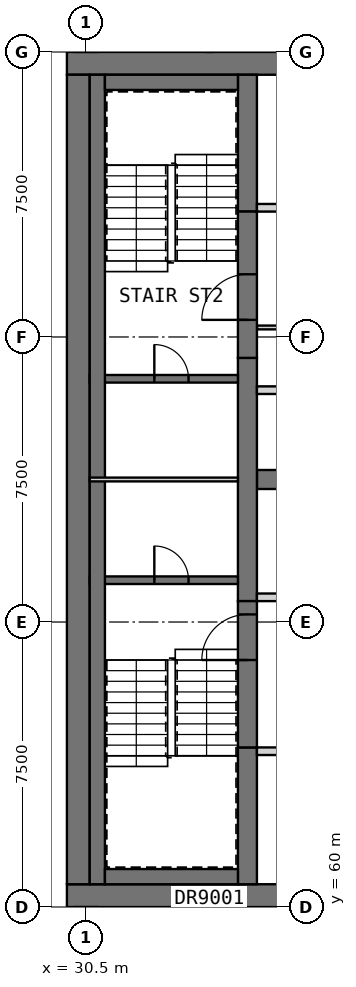
"""IFC4 building model, lengths in metres.
Left out: names, types, materials, properties, quantities, classifications, styles, units other than length and angle.
Written with IfcOpenShell. Run it as: python <this file> out.ifc"""

import sys

from ifc_helpers import new_model, si_unit, direction, frame, frame_2d, origin, place, context, subcontext, project, spatial, rectangle, extrude, element, fill, save


model = new_model("IFC4")
c1 = context("Model", 3, precision=1e-05, world=origin(), true_north=direction((0.0, 1.0)))
c2 = subcontext(c1, "Body", "Model", "MODEL_VIEW")
j1 = project(units=[si_unit("LENGTHUNIT", "METRE"), si_unit("PLANEANGLEUNIT", "RADIAN")], contexts=[c1])
p1 = place(None, origin())
s1 = spatial("IfcSite", under=j1, at=p1, CompositionType="ELEMENT")
p2 = place(p1, origin())
s2 = spatial("IfcBuilding", under=s1, at=p2, CompositionType="ELEMENT")
p3 = place(p2, frame((0.0, 0.0, 280.2)))
s3 = spatial("IfcBuildingStorey", under=s2, at=p3, CompositionType="ELEMENT", Elevation=280.2)
p4 = place(p3, frame((30.0, 60.3, 0.0), z_axis=(0.0, 0.0, 1.0), x_axis=(1.0, 0.0, 0.0)))
e1 = element("IfcWall", 1, at=p4, inside=s3, PredefinedType="SHEAR", context=c2, shape_type="SweptSolid", body=[
    extrude(rectangle(XDim=30.0, YDim=0.6, at=frame_2d((15.0, 0.0))), origin(), (0.0, 0.0, 1.0), 3.5),
])
p5 = place(p4, frame((21.9, 0.0, 0.0)))
e2 = element("IfcOpeningElement", 2, at=p5, cuts=e1, PredefinedType="OPENING", context=c2, shape_type="SweptSolid", body=[
    extrude(rectangle(XDim=1.8, YDim=2.1, at=frame_2d((0.9, 1.05))), frame((0.0, 0.31, 0.0), z_axis=(0.0, -1.0, 0.0), x_axis=(1.0, 0.0, 0.0)), (0.0, 0.0, 1.0), 0.62),
])
p6 = place(p4, frame((26.5, 0.0, 0.0)))
e3 = element("IfcOpeningElement", 3, at=p6, cuts=e1, PredefinedType="OPENING", context=c2, shape_type="SweptSolid", body=[
    extrude(rectangle(XDim=1.2, YDim=2.1, at=frame_2d((0.6, 1.05))), frame((0.0, 0.31, 0.0), z_axis=(0.0, -1.0, 0.0), x_axis=(1.0, 0.0, 0.0)), (0.0, 0.0, 1.0), 0.62),
])
p7 = place(p3, frame((30.0, 82.2, 0.0), z_axis=(0.0, 0.0, 1.0), x_axis=(1.0, 0.0, 0.0)))
e4 = element("IfcWall", 4, at=p7, inside=s3, PredefinedType="SHEAR", context=c2, shape_type="SweptSolid", body=[
    extrude(rectangle(XDim=30.0, YDim=0.6, at=frame_2d((15.0, 0.0))), origin(), (0.0, 0.0, 1.0), 3.5),
])
p8 = place(p3, frame((30.3, 60.6, 0.0), z_axis=(0.0, 0.0, 1.0), x_axis=(0.0, 1.0, 0.0)))
e5 = element("IfcWall", 5, at=p8, inside=s3, PredefinedType="SHEAR", context=c2, shape_type="SweptSolid", body=[
    extrude(rectangle(XDim=21.3, YDim=0.6, at=frame_2d((10.65, 0.0))), origin(), (0.0, 0.0, 1.0), 3.5),
])
p9 = place(p3, frame((35.0, 71.25, 0.0), z_axis=(0.0, 0.0, 1.0), x_axis=(1.0, 0.0, 0.0)))
e6 = element("IfcWall", 6, at=p9, inside=s3, PredefinedType="SHEAR", context=c2, shape_type="SweptSolid", body=[
    extrude(rectangle(XDim=15.6, YDim=0.5, at=frame_2d((7.8, 0.0))), origin(), (0.0, 0.0, 1.0), 3.5),
])
p10 = place(p3, frame((34.75, 60.6, 0.0), z_axis=(0.0, 0.0, 1.0), x_axis=(0.0, 1.0, 0.0)))
e7 = element("IfcWall", 7, at=p10, inside=s3, PredefinedType="SHEAR", context=c2, shape_type="SweptSolid", body=[
    extrude(rectangle(XDim=3.6, YDim=0.5, at=frame_2d((1.8, 0.0))), origin(), (0.0, 0.0, 1.0), 3.5),
])
p11 = place(p3, frame((34.75, 68.05, 0.0), z_axis=(0.0, 0.0, 1.0), x_axis=(0.0, 1.0, 0.0)))
e8 = element("IfcWall", 8, at=p11, inside=s3, PredefinedType="SHEAR", context=c2, shape_type="SweptSolid", body=[
    extrude(rectangle(XDim=6.4, YDim=0.5, at=frame_2d((3.2, 0.0))), origin(), (0.0, 0.0, 1.0), 3.5),
])
p12 = place(p3, frame((34.75, 78.3, 0.0), z_axis=(0.0, 0.0, 1.0), x_axis=(0.0, 1.0, 0.0)))
e9 = element("IfcWall", 9, at=p12, inside=s3, PredefinedType="SHEAR", context=c2, shape_type="SweptSolid", body=[
    extrude(rectangle(XDim=3.6, YDim=0.5, at=frame_2d((1.8, 0.0))), origin(), (0.0, 0.0, 1.0), 3.5),
])
p13 = place(p2, frame((0.0, 0.0, 34.0)))
s4 = spatial("IfcBuildingStorey", under=s2, at=p13, CompositionType="ELEMENT", Elevation=34.0)
for number, where, z_axis, x_axis in (
    (10, (29.7, 61.05, 0.0), (0.0, 0.0, 1.0), (0.0, 1.0, 0.0)),
    (11, (29.7, 65.925, 0.0), (0.0, 0.0, 1.0), (0.0, 1.0, 0.0)),
    (12, (29.7, 70.8, 0.0), (0.0, 0.0, 1.0), (0.0, 1.0, 0.0)),
    (13, (29.7, 75.675, 0.0), (0.0, 0.0, 1.0), (0.0, 1.0, 0.0)),
    (14, (29.7, 80.55, 0.0), (0.0, 0.0, 1.0), (0.0, 1.0, 0.0)),
):
    element("IfcWall", number, at=place(p13, frame(where, z_axis=z_axis, x_axis=x_axis)), inside=s4, PredefinedType="SOLIDWALL", context=c2, shape_type="SweptSolid", body=[
        extrude(rectangle(XDim=0.9, YDim=0.6, at=frame_2d((0.45, 0.0))), origin(), (0.0, 0.0, 1.0), 286.2),
    ])
p14 = place(p3, frame((35.0, 64.1, 0.0), z_axis=(0.0, 0.0, 1.0), x_axis=(1.0, 0.0, 0.0)))
e15 = element("IfcWall", 15, at=p14, inside=s3, PredefinedType="PARTITIONING", context=c2, shape_type="SweptSolid", body=[
    extrude(rectangle(XDim=15.6, YDim=0.2, at=frame_2d((7.8, 0.0))), origin(), (0.0, 0.0, 1.0), 3.25),
])
p15 = place(p14, frame((2.15, 0.0, 0.0)))
e16 = element("IfcOpeningElement", 16, at=p15, cuts=e15, PredefinedType="OPENING", context=c2, shape_type="SweptSolid", body=[
    extrude(rectangle(XDim=0.9, YDim=2.1, at=frame_2d((0.45, 1.05))), frame((0.0, 0.11, 0.0), z_axis=(0.0, -1.0, 0.0), x_axis=(1.0, 0.0, 0.0)), (0.0, 0.0, 1.0), 0.22),
])
p16 = place(p14, frame((9.95, 0.0, 0.0)))
e17 = element("IfcOpeningElement", 17, at=p16, cuts=e15, PredefinedType="OPENING", context=c2, shape_type="SweptSolid", body=[
    extrude(rectangle(XDim=0.9, YDim=2.1, at=frame_2d((0.45, 1.05))), frame((0.0, 0.11, 0.0), z_axis=(0.0, -1.0, 0.0), x_axis=(1.0, 0.0, 0.0)), (0.0, 0.0, 1.0), 0.22),
])
p17 = place(p3, frame((35.0, 68.15, 0.0), z_axis=(0.0, 0.0, 1.0), x_axis=(1.0, 0.0, 0.0)))
e18 = element("IfcWall", 18, at=p17, inside=s3, PredefinedType="PARTITIONING", context=c2, shape_type="SweptSolid", body=[
    extrude(rectangle(XDim=15.6, YDim=0.2, at=frame_2d((7.8, 0.0))), origin(), (0.0, 0.0, 1.0), 3.25),
])
p18 = place(p17, frame((1.5, 0.0, 0.0)))
e19 = element("IfcOpeningElement", 19, at=p18, cuts=e18, PredefinedType="OPENING", context=c2, shape_type="SweptSolid", body=[
    extrude(rectangle(XDim=0.9, YDim=2.1, at=frame_2d((0.45, 1.05))), frame((0.0, 0.11, 0.0), z_axis=(0.0, -1.0, 0.0), x_axis=(1.0, 0.0, 0.0)), (0.0, 0.0, 1.0), 0.22),
])
p19 = place(p17, frame((7.35, 0.0, 0.0)))
e20 = element("IfcOpeningElement", 20, at=p19, cuts=e18, PredefinedType="OPENING", context=c2, shape_type="SweptSolid", body=[
    extrude(rectangle(XDim=0.9, YDim=2.1, at=frame_2d((0.45, 1.05))), frame((0.0, 0.11, 0.0), z_axis=(0.0, -1.0, 0.0), x_axis=(1.0, 0.0, 0.0)), (0.0, 0.0, 1.0), 0.22),
])
p20 = place(p17, frame((13.2, 0.0, 0.0)))
e21 = element("IfcOpeningElement", 21, at=p20, cuts=e18, PredefinedType="OPENING", context=c2, shape_type="SweptSolid", body=[
    extrude(rectangle(XDim=0.9, YDim=2.1, at=frame_2d((0.45, 1.05))), frame((0.0, 0.11, 0.0), z_axis=(0.0, -1.0, 0.0), x_axis=(1.0, 0.0, 0.0)), (0.0, 0.0, 1.0), 0.22),
])
p21 = place(p3, frame((35.0, 73.6, 0.0), z_axis=(0.0, 0.0, 1.0), x_axis=(1.0, 0.0, 0.0)))
e22 = element("IfcWall", 22, at=p21, inside=s3, PredefinedType="SOLIDWALL", context=c2, shape_type="SweptSolid", body=[
    extrude(rectangle(XDim=15.6, YDim=0.2, at=frame_2d((7.8, 0.0))), origin(), (0.0, 0.0, 1.0), 3.5),
])
p22 = place(p21, frame((0.75, 0.0, 0.0)))
e23 = element("IfcOpeningElement", 23, at=p22, cuts=e22, PredefinedType="OPENING", context=c2, shape_type="SweptSolid", body=[
    extrude(rectangle(XDim=1.1, YDim=2.1, at=frame_2d((0.55, 1.05))), frame((0.0, 0.11, 0.0), z_axis=(0.0, -1.0, 0.0), x_axis=(1.0, 0.0, 0.0)), (0.0, 0.0, 1.0), 0.22),
])
p23 = place(p21, frame((3.35, 0.0, 0.0)))
e24 = element("IfcOpeningElement", 24, at=p23, cuts=e22, PredefinedType="OPENING", context=c2, shape_type="SweptSolid", body=[
    extrude(rectangle(XDim=1.1, YDim=2.1, at=frame_2d((0.55, 1.05))), frame((0.0, 0.11, 0.0), z_axis=(0.0, -1.0, 0.0), x_axis=(1.0, 0.0, 0.0)), (0.0, 0.0, 1.0), 0.22),
])
p24 = place(p21, frame((5.95, 0.0, 0.0)))
e25 = element("IfcOpeningElement", 25, at=p24, cuts=e22, PredefinedType="OPENING", context=c2, shape_type="SweptSolid", body=[
    extrude(rectangle(XDim=1.1, YDim=2.1, at=frame_2d((0.55, 1.05))), frame((0.0, 0.11, 0.0), z_axis=(0.0, -1.0, 0.0), x_axis=(1.0, 0.0, 0.0)), (0.0, 0.0, 1.0), 0.22),
])
p25 = place(p21, frame((8.55, 0.0, 0.0)))
e26 = element("IfcOpeningElement", 26, at=p25, cuts=e22, PredefinedType="OPENING", context=c2, shape_type="SweptSolid", body=[
    extrude(rectangle(XDim=1.1, YDim=2.1, at=frame_2d((0.55, 1.05))), frame((0.0, 0.11, 0.0), z_axis=(0.0, -1.0, 0.0), x_axis=(1.0, 0.0, 0.0)), (0.0, 0.0, 1.0), 0.22),
])
p26 = place(p21, frame((11.15, 0.0, 0.0)))
e27 = element("IfcOpeningElement", 27, at=p26, cuts=e22, PredefinedType="OPENING", context=c2, shape_type="SweptSolid", body=[
    extrude(rectangle(XDim=1.1, YDim=2.1, at=frame_2d((0.55, 1.05))), frame((0.0, 0.11, 0.0), z_axis=(0.0, -1.0, 0.0), x_axis=(1.0, 0.0, 0.0)), (0.0, 0.0, 1.0), 0.22),
])
p27 = place(p21, frame((13.75, 0.0, 0.0)))
e28 = element("IfcOpeningElement", 28, at=p27, cuts=e22, PredefinedType="OPENING", context=c2, shape_type="SweptSolid", body=[
    extrude(rectangle(XDim=1.1, YDim=2.1, at=frame_2d((0.55, 1.05))), frame((0.0, 0.11, 0.0), z_axis=(0.0, -1.0, 0.0), x_axis=(1.0, 0.0, 0.0)), (0.0, 0.0, 1.0), 0.22),
])
p28 = place(p3, frame((35.0, 78.4, 0.0), z_axis=(0.0, 0.0, 1.0), x_axis=(1.0, 0.0, 0.0)))
e29 = element("IfcWall", 29, at=p28, inside=s3, PredefinedType="SOLIDWALL", context=c2, shape_type="SweptSolid", body=[
    extrude(rectangle(XDim=15.6, YDim=0.2, at=frame_2d((7.8, 0.0))), origin(), (0.0, 0.0, 1.0), 3.5),
])
p29 = place(p28, frame((0.75, 0.0, 0.0)))
e30 = element("IfcOpeningElement", 30, at=p29, cuts=e29, PredefinedType="OPENING", context=c2, shape_type="SweptSolid", body=[
    extrude(rectangle(XDim=1.1, YDim=2.1, at=frame_2d((0.55, 1.05))), frame((0.0, 0.11, 0.0), z_axis=(0.0, -1.0, 0.0), x_axis=(1.0, 0.0, 0.0)), (0.0, 0.0, 1.0), 0.22),
])
p30 = place(p28, frame((3.35, 0.0, 0.0)))
e31 = element("IfcOpeningElement", 31, at=p30, cuts=e29, PredefinedType="OPENING", context=c2, shape_type="SweptSolid", body=[
    extrude(rectangle(XDim=1.1, YDim=2.1, at=frame_2d((0.55, 1.05))), frame((0.0, 0.11, 0.0), z_axis=(0.0, -1.0, 0.0), x_axis=(1.0, 0.0, 0.0)), (0.0, 0.0, 1.0), 0.22),
])
p31 = place(p28, frame((11.15, 0.0, 0.0)))
e32 = element("IfcOpeningElement", 32, at=p31, cuts=e29, PredefinedType="OPENING", context=c2, shape_type="SweptSolid", body=[
    extrude(rectangle(XDim=1.1, YDim=2.1, at=frame_2d((0.55, 1.05))), frame((0.0, 0.11, 0.0), z_axis=(0.0, -1.0, 0.0), x_axis=(1.0, 0.0, 0.0)), (0.0, 0.0, 1.0), 0.22),
])
p32 = place(p28, frame((13.75, 0.0, 0.0)))
e33 = element("IfcOpeningElement", 33, at=p32, cuts=e29, PredefinedType="OPENING", context=c2, shape_type="SweptSolid", body=[
    extrude(rectangle(XDim=1.1, YDim=2.1, at=frame_2d((0.55, 1.05))), frame((0.0, 0.11, 0.0), z_axis=(0.0, -1.0, 0.0), x_axis=(1.0, 0.0, 0.0)), (0.0, 0.0, 1.0), 0.22),
])
p33 = place(p3, frame((35.0, 75.25, 0.0), z_axis=(0.0, 0.0, 1.0), x_axis=(1.0, 0.0, 0.0)))
e34 = element("IfcWall", 34, at=p33, inside=s3, PredefinedType="PARTITIONING", context=c2, shape_type="SweptSolid", body=[
    extrude(rectangle(XDim=5.25, YDim=0.1, at=frame_2d((2.625, 0.0))), origin(), (0.0, 0.0, 1.0), 3.25),
])
p34 = place(p3, frame((34.75, 64.2, 0.0), z_axis=(0.0, 0.0, 1.0), x_axis=(0.0, 1.0, 0.0)))
e35 = element("IfcWall", 35, at=p34, inside=s3, PredefinedType="SOLIDWALL", context=c2, shape_type="SweptSolid", body=[
    extrude(rectangle(XDim=3.85, YDim=0.5, at=frame_2d((1.925, 0.0))), origin(), (0.0, 0.0, 1.0), 2.3),
])
p35 = place(p34, frame((2.3, 0.0, 0.0)))
e36 = element("IfcOpeningElement", 36, at=p35, cuts=e35, PredefinedType="OPENING", context=c2, shape_type="SweptSolid", body=[
    extrude(rectangle(XDim=1.2, YDim=2.1, at=frame_2d((0.6, 1.05))), frame((0.0, 0.26, 0.0), z_axis=(0.0, -1.0, 0.0), x_axis=(1.0, 0.0, 0.0)), (0.0, 0.0, 1.0), 0.52),
])
p36 = place(p3, frame((34.75, 74.45, 0.0), z_axis=(0.0, 0.0, 1.0), x_axis=(0.0, 1.0, 0.0)))
e37 = element("IfcWall", 37, at=p36, inside=s3, PredefinedType="SOLIDWALL", context=c2, shape_type="SweptSolid", body=[
    extrude(rectangle(XDim=3.85, YDim=0.5, at=frame_2d((1.925, 0.0))), origin(), (0.0, 0.0, 1.0), 2.3),
])
p37 = place(p36, frame((1.0, 0.0, 0.0)))
e38 = element("IfcOpeningElement", 38, at=p37, cuts=e37, PredefinedType="OPENING", context=c2, shape_type="SweptSolid", body=[
    extrude(rectangle(XDim=1.2, YDim=2.1, at=frame_2d((0.6, 1.05))), frame((0.0, 0.26, 0.0), z_axis=(0.0, -1.0, 0.0), x_axis=(1.0, 0.0, 0.0)), (0.0, 0.0, 1.0), 0.52),
])
p38 = place(p3, frame((30.6, 68.6, 0.0), z_axis=(0.0, 0.0, 1.0), x_axis=(1.0, 0.0, 0.0)))
e39 = element("IfcWall", 39, at=p38, inside=s3, PredefinedType="SOLIDWALL", context=c2, shape_type="SweptSolid", body=[
    extrude(rectangle(XDim=3.9, YDim=0.2, at=frame_2d((1.95, 0.0))), origin(), (0.0, 0.0, 1.0), 3.25),
])
p39 = place(p38, frame((1.7, 0.0, 0.0)))
e40 = element("IfcOpeningElement", 40, at=p39, cuts=e39, PredefinedType="OPENING", context=c2, shape_type="SweptSolid", body=[
    extrude(rectangle(XDim=0.9, YDim=2.1, at=frame_2d((0.45, 1.05))), frame((0.0, 0.11, 0.0), z_axis=(0.0, -1.0, 0.0), x_axis=(1.0, 0.0, 0.0)), (0.0, 0.0, 1.0), 0.22),
])
p40 = place(p3, frame((30.6, 73.9, 0.0), z_axis=(0.0, 0.0, 1.0), x_axis=(1.0, 0.0, 0.0)))
e41 = element("IfcWall", 41, at=p40, inside=s3, PredefinedType="SOLIDWALL", context=c2, shape_type="SweptSolid", body=[
    extrude(rectangle(XDim=3.9, YDim=0.2, at=frame_2d((1.95, 0.0))), origin(), (0.0, 0.0, 1.0), 3.25),
])
p41 = place(p40, frame((1.7, 0.0, 0.0)))
e42 = element("IfcOpeningElement", 42, at=p41, cuts=e41, PredefinedType="OPENING", context=c2, shape_type="SweptSolid", body=[
    extrude(rectangle(XDim=0.9, YDim=2.1, at=frame_2d((0.45, 1.05))), frame((0.0, 0.11, 0.0), z_axis=(0.0, -1.0, 0.0), x_axis=(1.0, 0.0, 0.0)), (0.0, 0.0, 1.0), 0.22),
])
p42 = place(p3, frame((30.8, 60.6, 0.0), z_axis=(0.0, 0.0, 1.0), x_axis=(0.0, 1.0, 0.0)))
e43 = element("IfcWall", 43, at=p42, inside=s3, PredefinedType="SOLIDWALL", context=c2, shape_type="SweptSolid", body=[
    extrude(rectangle(XDim=21.3, YDim=0.4, at=frame_2d((10.65, 0.0))), origin(), (0.0, 0.0, 1.0), 3.25),
])
for number, where, z_axis, x_axis in (
    (44, (31.0, 60.8, 0.0), (0.0, 0.0, 1.0), (1.0, 0.0, 0.0)),
    (45, (31.0, 81.7, 0.0), (0.0, 0.0, 1.0), (1.0, 0.0, 0.0)),
):
    element("IfcWall", number, at=place(p3, frame(where, z_axis=z_axis, x_axis=x_axis)), inside=s3, PredefinedType="SOLIDWALL", context=c2, shape_type="SweptSolid", body=[
        extrude(rectangle(XDim=3.5, YDim=0.4, at=frame_2d((1.75, 0.0))), origin(), (0.0, 0.0, 1.0), 3.25),
    ])
p43 = place(p3, frame((30.6, 71.25, 0.0), z_axis=(0.0, 0.0, 1.0), x_axis=(1.0, 0.0, 0.0)))
e46 = element("IfcWall", 46, at=p43, inside=s3, PredefinedType="PARTITIONING", context=c2, shape_type="SweptSolid", body=[
    extrude(rectangle(XDim=3.9, YDim=0.1, at=frame_2d((1.95, 0.0))), origin(), (0.0, 0.0, 1.0), 3.25),
])
p44 = place(p35, origin())
e47 = element("IfcDoor", 47, at=p44, inside=s3, OperationType="SINGLE_SWING_LEFT", PredefinedType="DOOR", context=c2, shape_type="SweptSolid", body=[
    extrude(rectangle(XDim=1.2, YDim=2.1, at=frame_2d((0.6, 1.05))), frame((0.0, 0.025, 0.0), z_axis=(0.0, -1.0, 0.0), x_axis=(1.0, 0.0, 0.0)), (0.0, 0.0, 1.0), 0.05),
])
fill(e36, e47)
p45 = place(p37, origin())
e48 = element("IfcDoor", 48, at=p45, inside=s3, OperationType="SINGLE_SWING_RIGHT", PredefinedType="DOOR", context=c2, shape_type="SweptSolid", body=[
    extrude(rectangle(XDim=1.2, YDim=2.1, at=frame_2d((0.6, 1.05))), frame((0.0, 0.025, 0.0), z_axis=(0.0, -1.0, 0.0), x_axis=(1.0, 0.0, 0.0)), (0.0, 0.0, 1.0), 0.05),
])
fill(e38, e48)
p46 = place(p39, origin())
e49 = element("IfcDoor", 49, at=p46, inside=s3, OperationType="SINGLE_SWING_LEFT", PredefinedType="DOOR", context=c2, shape_type="SweptSolid", body=[
    extrude(rectangle(XDim=0.9, YDim=2.1, at=frame_2d((0.45, 1.05))), frame((0.0, 0.025, 0.0), z_axis=(0.0, -1.0, 0.0), x_axis=(1.0, 0.0, 0.0)), (0.0, 0.0, 1.0), 0.05),
])
fill(e40, e49)
p47 = place(p41, origin())
e50 = element("IfcDoor", 50, at=p47, inside=s3, OperationType="SINGLE_SWING_RIGHT", PredefinedType="DOOR", context=c2, shape_type="SweptSolid", body=[
    extrude(rectangle(XDim=0.9, YDim=2.1, at=frame_2d((0.45, 1.05))), frame((0.0, 0.025, 0.0), z_axis=(0.0, -1.0, 0.0), x_axis=(1.0, 0.0, 0.0)), (0.0, 0.0, 1.0), 0.05),
])
fill(e42, e50)
save(model, sys.argv[1])
